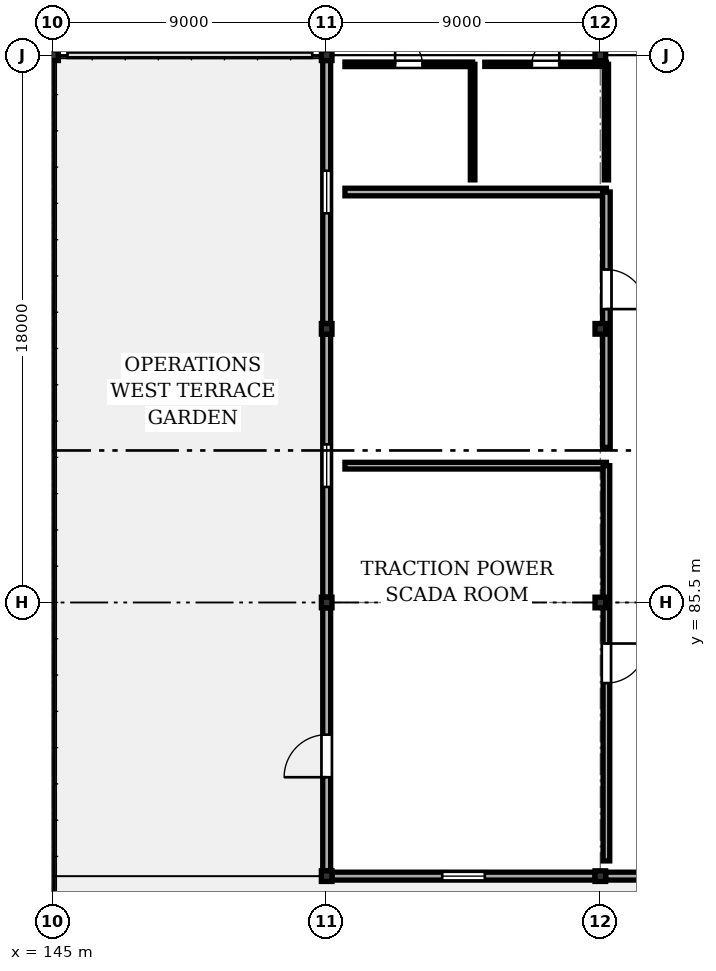
"""IFC4 building model, lengths in metres.
Left out: names, types, materials, properties, quantities, classifications, styles, units other than length and angle.
Written with IfcOpenShell. Run it as: python <this file> out.ifc"""

import sys

from ifc_helpers import new_model, si_unit, direction, frame, frame_2d, origin, origin_2d, place, context, subcontext, project, spatial, rectangle, i_section, extrude, element, fill, save


model = new_model("IFC4")
c1 = context("Model", 3, precision=1e-05, world=origin(), true_north=direction((0.0, 1.0)))
c2 = subcontext(c1, "Body", "Model", "MODEL_VIEW")
j1 = project(units=[si_unit("LENGTHUNIT", "METRE"), si_unit("PLANEANGLEUNIT", "RADIAN")], contexts=[c1])
p1 = place(None, origin())
s1 = spatial("IfcSite", under=j1, at=p1, CompositionType="ELEMENT")
p2 = place(p1, origin())
s2 = spatial("IfcBuilding", under=s1, at=p2, CompositionType="ELEMENT")
p3 = place(p2, frame((0.0, 0.0, 17.6)))
s3 = spatial("IfcBuildingStorey", under=s2, at=p3, CompositionType="ELEMENT", Elevation=17.6)
for number, where, z_axis, x_axis in (
    (1, (145.0, 103.5, 0.0), (0.0, 0.0, 1.0), (1.0, 0.0, 0.0)),
    (2, (154.0, 76.5, 0.0), (0.0, 0.0, 1.0), (1.0, 0.0, 0.0)),
    (3, (154.0, 85.5, 0.0), (0.0, 0.0, 1.0), (1.0, 0.0, 0.0)),
    (4, (154.0, 94.5, 0.0), (0.0, 0.0, 1.0), (1.0, 0.0, 0.0)),
    (5, (154.0, 103.5, 0.0), (0.0, 0.0, 1.0), (1.0, 0.0, 0.0)),
    (6, (163.0, 76.5, 0.0), (0.0, 0.0, 1.0), (1.0, 0.0, 0.0)),
    (7, (163.0, 85.5, 0.0), (0.0, 0.0, 1.0), (1.0, 0.0, 0.0)),
    (8, (163.0, 94.5, 0.0), (0.0, 0.0, 1.0), (1.0, 0.0, 0.0)),
    (9, (163.0, 103.5, 0.0), (0.0, 0.0, 1.0), (1.0, 0.0, 0.0)),
):
    element("IfcColumn", number, at=place(p3, frame(where, z_axis=z_axis, x_axis=x_axis)), inside=s3, PredefinedType="COLUMN", context=c2, shape_type="SweptSolid", body=[
        extrude(i_section(OverallWidth=0.35, OverallDepth=0.35, WebThickness=0.012, FlangeThickness=0.019, FilletRadius=0.02, at=origin_2d()), origin(), (0.0, 0.0, 1.0), 3.2),
    ])
p4 = place(p3, frame((171.825, 76.5, 0.0), z_axis=(0.0, 0.0, 1.0), x_axis=(-1.0, 0.0, 0.0)))
e10 = element("IfcWall", 10, at=p4, inside=s3, PredefinedType="SOLIDWALL", context=c2, shape_type="SweptSolid", body=[
    extrude(rectangle(XDim=8.65, YDim=0.26, at=frame_2d((4.325, 0.0))), origin(), (0.0, 0.0, 1.0), 2.505),
])
p5 = place(p4, frame((3.078, 0.0, 0.0)))
e11 = element("IfcOpeningElement", 11, at=p5, cuts=e10, PredefinedType="OPENING", context=c2, shape_type="SweptSolid", body=[
    extrude(rectangle(XDim=1.4, YDim=2.25, at=frame_2d((0.7, 1.125))), frame((0.0, 0.14, 0.0), z_axis=(0.0, -1.0, 0.0), x_axis=(1.0, 0.0, 0.0)), (0.0, 0.0, 1.0), 0.28),
])
p6 = place(p3, frame((162.825, 76.5, 0.0), z_axis=(0.0, 0.0, 1.0), x_axis=(-1.0, 0.0, 0.0)))
e12 = element("IfcWall", 12, at=p6, inside=s3, PredefinedType="SOLIDWALL", context=c2, shape_type="SweptSolid", body=[
    extrude(rectangle(XDim=8.65, YDim=0.26, at=frame_2d((4.325, 0.0))), origin(), (0.0, 0.0, 1.0), 2.505),
])
p7 = place(p6, frame((3.625, 0.0, 0.75)))
e13 = element("IfcOpeningElement", 13, at=p7, cuts=e12, PredefinedType="OPENING", context=c2, shape_type="SweptSolid", body=[
    extrude(rectangle(XDim=1.4, YDim=1.55, at=frame_2d((0.7, 0.775))), frame((0.0, 0.14, 0.0), z_axis=(0.0, -1.0, 0.0), x_axis=(1.0, 0.0, 0.0)), (0.0, 0.0, 1.0), 0.28),
])
p8 = place(p3, frame((154.0, 76.675, 0.0), z_axis=(0.0, 0.0, 1.0), x_axis=(0.0, 1.0, 0.0)))
e14 = element("IfcWall", 14, at=p8, inside=s3, PredefinedType="SOLIDWALL", context=c2, shape_type="SweptSolid", body=[
    extrude(rectangle(XDim=8.65, YDim=0.26, at=frame_2d((4.325, 0.0))), origin(), (0.0, 0.0, 1.0), 2.505),
])
p9 = place(p8, frame((3.078, 0.0, 0.0)))
e15 = element("IfcOpeningElement", 15, at=p9, cuts=e14, PredefinedType="OPENING", context=c2, shape_type="SweptSolid", body=[
    extrude(rectangle(XDim=1.4, YDim=2.25, at=frame_2d((0.7, 1.125))), frame((0.0, 0.14, 0.0), z_axis=(0.0, -1.0, 0.0), x_axis=(1.0, 0.0, 0.0)), (0.0, 0.0, 1.0), 0.28),
])
p10 = place(p3, frame((154.0, 85.675, 0.0), z_axis=(0.0, 0.0, 1.0), x_axis=(0.0, 1.0, 0.0)))
e16 = element("IfcWall", 16, at=p10, inside=s3, PredefinedType="SOLIDWALL", context=c2, shape_type="SweptSolid", body=[
    extrude(rectangle(XDim=8.65, YDim=0.26, at=frame_2d((4.325, 0.0))), origin(), (0.0, 0.0, 1.0), 2.505),
])
p11 = place(p10, frame((3.625, 0.0, 0.75)))
e17 = element("IfcOpeningElement", 17, at=p11, cuts=e16, PredefinedType="OPENING", context=c2, shape_type="SweptSolid", body=[
    extrude(rectangle(XDim=1.4, YDim=1.55, at=frame_2d((0.7, 0.775))), frame((0.0, 0.14, 0.0), z_axis=(0.0, -1.0, 0.0), x_axis=(1.0, 0.0, 0.0)), (0.0, 0.0, 1.0), 0.28),
])
p12 = place(p3, frame((154.0, 94.675, 0.0), z_axis=(0.0, 0.0, 1.0), x_axis=(0.0, 1.0, 0.0)))
e18 = element("IfcWall", 18, at=p12, inside=s3, PredefinedType="SOLIDWALL", context=c2, shape_type="SweptSolid", body=[
    extrude(rectangle(XDim=8.65, YDim=0.26, at=frame_2d((4.325, 0.0))), origin(), (0.0, 0.0, 1.0), 2.505),
])
p13 = place(p12, frame((3.625, 0.0, 0.75)))
e19 = element("IfcOpeningElement", 19, at=p13, cuts=e18, PredefinedType="OPENING", context=c2, shape_type="SweptSolid", body=[
    extrude(rectangle(XDim=1.4, YDim=1.55, at=frame_2d((0.7, 0.775))), frame((0.0, 0.14, 0.0), z_axis=(0.0, -1.0, 0.0), x_axis=(1.0, 0.0, 0.0)), (0.0, 0.0, 1.0), 0.28),
])
p14 = place(p3, frame((154.6, 90.0, 0.0), z_axis=(0.0, 0.0, 1.0), x_axis=(1.0, 0.0, 0.0)))
e20 = element("IfcWall", 20, at=p14, inside=s3, PredefinedType="SOLIDWALL", context=c2, shape_type="SweptSolid", body=[
    extrude(rectangle(XDim=8.6, YDim=0.22, at=frame_2d((4.3, 0.0))), origin(), (0.0, 0.0, 1.0), 2.555),
])
p15 = place(p3, frame((163.2, 90.0, 0.0), z_axis=(0.0, 0.0, 1.0), x_axis=(0.0, -1.0, 0.0)))
e21 = element("IfcWall", 21, at=p15, inside=s3, PredefinedType="SOLIDWALL", context=c2, shape_type="SweptSolid", body=[
    extrude(rectangle(XDim=13.0, YDim=0.22, at=frame_2d((6.5, 0.0))), origin(), (0.0, 0.0, 1.0), 2.505),
])
p16 = place(p15, frame((5.85, 0.0, 0.0)))
e22 = element("IfcOpeningElement", 22, at=p16, cuts=e21, PredefinedType="OPENING", context=c2, shape_type="SweptSolid", body=[
    extrude(rectangle(XDim=1.3, YDim=2.1, at=frame_2d((0.65, 1.05))), frame((0.0, 0.12, 0.0), z_axis=(0.0, -1.0, 0.0), x_axis=(1.0, 0.0, 0.0)), (0.0, 0.0, 1.0), 0.24),
])
p17 = place(p3, frame((154.6, 99.0, 0.0), z_axis=(0.0, 0.0, 1.0), x_axis=(1.0, 0.0, 0.0)))
e23 = element("IfcWall", 23, at=p17, inside=s3, PredefinedType="SOLIDWALL", context=c2, shape_type="SweptSolid", body=[
    extrude(rectangle(XDim=8.6, YDim=0.25, at=frame_2d((4.3, 0.0))), origin(), (0.0, 0.0, 1.0), 2.555),
])
p18 = place(p3, frame((163.2, 99.0, 0.0), z_axis=(0.0, 0.0, 1.0), x_axis=(0.0, -1.0, 0.0)))
e24 = element("IfcWall", 24, at=p18, inside=s3, PredefinedType="SOLIDWALL", context=c2, shape_type="SweptSolid", body=[
    extrude(rectangle(XDim=8.4, YDim=0.25, at=frame_2d((4.2, 0.0))), origin(), (0.0, 0.0, 1.0), 2.505),
])
p19 = place(p18, frame((2.55, 0.0, 0.0)))
e25 = element("IfcOpeningElement", 25, at=p19, cuts=e24, PredefinedType="OPENING", context=c2, shape_type="SweptSolid", body=[
    extrude(rectangle(XDim=1.3, YDim=2.1, at=frame_2d((0.65, 1.05))), frame((0.0, 0.135, 0.0), z_axis=(0.0, -1.0, 0.0), x_axis=(1.0, 0.0, 0.0)), (0.0, 0.0, 1.0), 0.27),
])
p20 = place(p3, frame((154.6, 103.2, 0.0), z_axis=(0.0, 0.0, 1.0), x_axis=(1.0, 0.0, 0.0)))
e26 = element("IfcWall", 26, at=p20, inside=s3, PredefinedType="PARTITIONING", context=c2, shape_type="SweptSolid", body=[
    extrude(rectangle(XDim=4.2, YDim=0.15, at=frame_2d((2.1, 0.0))), origin(), (0.0, 0.0, 1.0), 2.505),
])
p21 = place(p20, frame((1.65, 0.0, 0.0)))
e27 = element("IfcOpeningElement", 27, at=p21, cuts=e26, PredefinedType="OPENING", context=c2, shape_type="SweptSolid", body=[
    extrude(rectangle(XDim=0.9, YDim=2.1, at=frame_2d((0.45, 1.05))), frame((0.0, 0.085, 0.0), z_axis=(0.0, -1.0, 0.0), x_axis=(1.0, 0.0, 0.0)), (0.0, 0.0, 1.0), 0.17),
])
p22 = place(p3, frame((158.8, 103.2, 0.0), z_axis=(0.0, 0.0, 1.0), x_axis=(0.0, -1.0, 0.0)))
e28 = element("IfcWall", 28, at=p22, inside=s3, PredefinedType="PARTITIONING", context=c2, shape_type="SweptSolid", body=[
    extrude(rectangle(XDim=3.8, YDim=0.15, at=frame_2d((1.9, 0.0))), origin(), (0.0, 0.0, 1.0), 2.505),
])
p23 = place(p3, frame((159.2, 103.2, 0.0), z_axis=(0.0, 0.0, 1.0), x_axis=(1.0, 0.0, 0.0)))
e29 = element("IfcWall", 29, at=p23, inside=s3, PredefinedType="PARTITIONING", context=c2, shape_type="SweptSolid", body=[
    extrude(rectangle(XDim=4.0, YDim=0.14, at=frame_2d((2.0, 0.0))), origin(), (0.0, 0.0, 1.0), 2.355),
])
p24 = place(p23, frame((1.55, 0.0, 0.0)))
e30 = element("IfcOpeningElement", 30, at=p24, cuts=e29, PredefinedType="OPENING", context=c2, shape_type="SweptSolid", body=[
    extrude(rectangle(XDim=0.9, YDim=2.1, at=frame_2d((0.45, 1.05))), frame((0.0, 0.08, 0.0), z_axis=(0.0, -1.0, 0.0), x_axis=(1.0, 0.0, 0.0)), (0.0, 0.0, 1.0), 0.16),
])
p25 = place(p3, frame((163.2, 103.2, 0.0), z_axis=(0.0, 0.0, 1.0), x_axis=(0.0, -1.0, 0.0)))
e31 = element("IfcWall", 31, at=p25, inside=s3, PredefinedType="PARTITIONING", context=c2, shape_type="SweptSolid", body=[
    extrude(rectangle(XDim=3.8, YDim=0.14, at=frame_2d((1.9, 0.0))), origin(), (0.0, 0.0, 1.0), 2.355),
])
p26 = place(p7, origin())
e32 = element("IfcWindow", 32, at=p26, inside=s3, PartitioningType="SINGLE_PANEL", PredefinedType="WINDOW", context=c2, shape_type="SweptSolid", body=[
    extrude(rectangle(XDim=1.4, YDim=1.55, at=frame_2d((0.7, 0.775))), frame((0.0, 0.03, 0.0), z_axis=(0.0, -1.0, 0.0), x_axis=(1.0, 0.0, 0.0)), (0.0, 0.0, 1.0), 0.06),
])
fill(e13, e32)
p27 = place(p9, origin())
e33 = element("IfcDoor", 33, at=p27, inside=s3, OperationType="SINGLE_SWING_LEFT", PredefinedType="DOOR", context=c2, shape_type="SweptSolid", body=[
    extrude(rectangle(XDim=1.4, YDim=2.25, at=frame_2d((0.7, 1.125))), frame((0.0, 0.025, 0.0), z_axis=(0.0, -1.0, 0.0), x_axis=(1.0, 0.0, 0.0)), (0.0, 0.0, 1.0), 0.05),
])
fill(e15, e33)
p28 = place(p11, origin())
e34 = element("IfcWindow", 34, at=p28, inside=s3, PartitioningType="SINGLE_PANEL", PredefinedType="WINDOW", context=c2, shape_type="SweptSolid", body=[
    extrude(rectangle(XDim=1.4, YDim=1.55, at=frame_2d((0.7, 0.775))), frame((0.0, 0.03, 0.0), z_axis=(0.0, -1.0, 0.0), x_axis=(1.0, 0.0, 0.0)), (0.0, 0.0, 1.0), 0.06),
])
fill(e17, e34)
p29 = place(p13, origin())
e35 = element("IfcWindow", 35, at=p29, inside=s3, PartitioningType="SINGLE_PANEL", PredefinedType="WINDOW", context=c2, shape_type="SweptSolid", body=[
    extrude(rectangle(XDim=1.4, YDim=1.55, at=frame_2d((0.7, 0.775))), frame((0.0, 0.03, 0.0), z_axis=(0.0, -1.0, 0.0), x_axis=(1.0, 0.0, 0.0)), (0.0, 0.0, 1.0), 0.06),
])
fill(e19, e35)
p30 = place(p16, origin())
e36 = element("IfcDoor", 36, at=p30, inside=s3, OperationType="SINGLE_SWING_LEFT", PredefinedType="DOOR", context=c2, shape_type="SweptSolid", body=[
    extrude(rectangle(XDim=1.3, YDim=2.1, at=frame_2d((0.65, 1.05))), frame((0.0, 0.025, 0.0), z_axis=(0.0, -1.0, 0.0), x_axis=(1.0, 0.0, 0.0)), (0.0, 0.0, 1.0), 0.05),
])
fill(e22, e36)
p31 = place(p19, origin())
e37 = element("IfcDoor", 37, at=p31, inside=s3, OperationType="SINGLE_SWING_RIGHT", PredefinedType="DOOR", context=c2, shape_type="SweptSolid", body=[
    extrude(rectangle(XDim=1.3, YDim=2.1, at=frame_2d((0.65, 1.05))), frame((0.0, 0.025, 0.0), z_axis=(0.0, -1.0, 0.0), x_axis=(1.0, 0.0, 0.0)), (0.0, 0.0, 1.0), 0.05),
])
fill(e25, e37)
p32 = place(p21, origin())
e38 = element("IfcDoor", 38, at=p32, inside=s3, OperationType="SINGLE_SWING_LEFT", PredefinedType="DOOR", context=c2, shape_type="SweptSolid", body=[
    extrude(rectangle(XDim=0.9, YDim=2.1, at=frame_2d((0.45, 1.05))), frame((0.0, 0.025, 0.0), z_axis=(0.0, -1.0, 0.0), x_axis=(1.0, 0.0, 0.0)), (0.0, 0.0, 1.0), 0.05),
])
fill(e27, e38)
p33 = place(p24, origin())
e39 = element("IfcDoor", 39, at=p33, inside=s3, OperationType="SINGLE_SWING_RIGHT", PredefinedType="DOOR", context=c2, shape_type="SweptSolid", body=[
    extrude(rectangle(XDim=0.9, YDim=2.1, at=frame_2d((0.45, 1.05))), frame((0.0, 0.025, 0.0), z_axis=(0.0, -1.0, 0.0), x_axis=(1.0, 0.0, 0.0)), (0.0, 0.0, 1.0), 0.05),
])
fill(e30, e39)
save(model, sys.argv[1])
